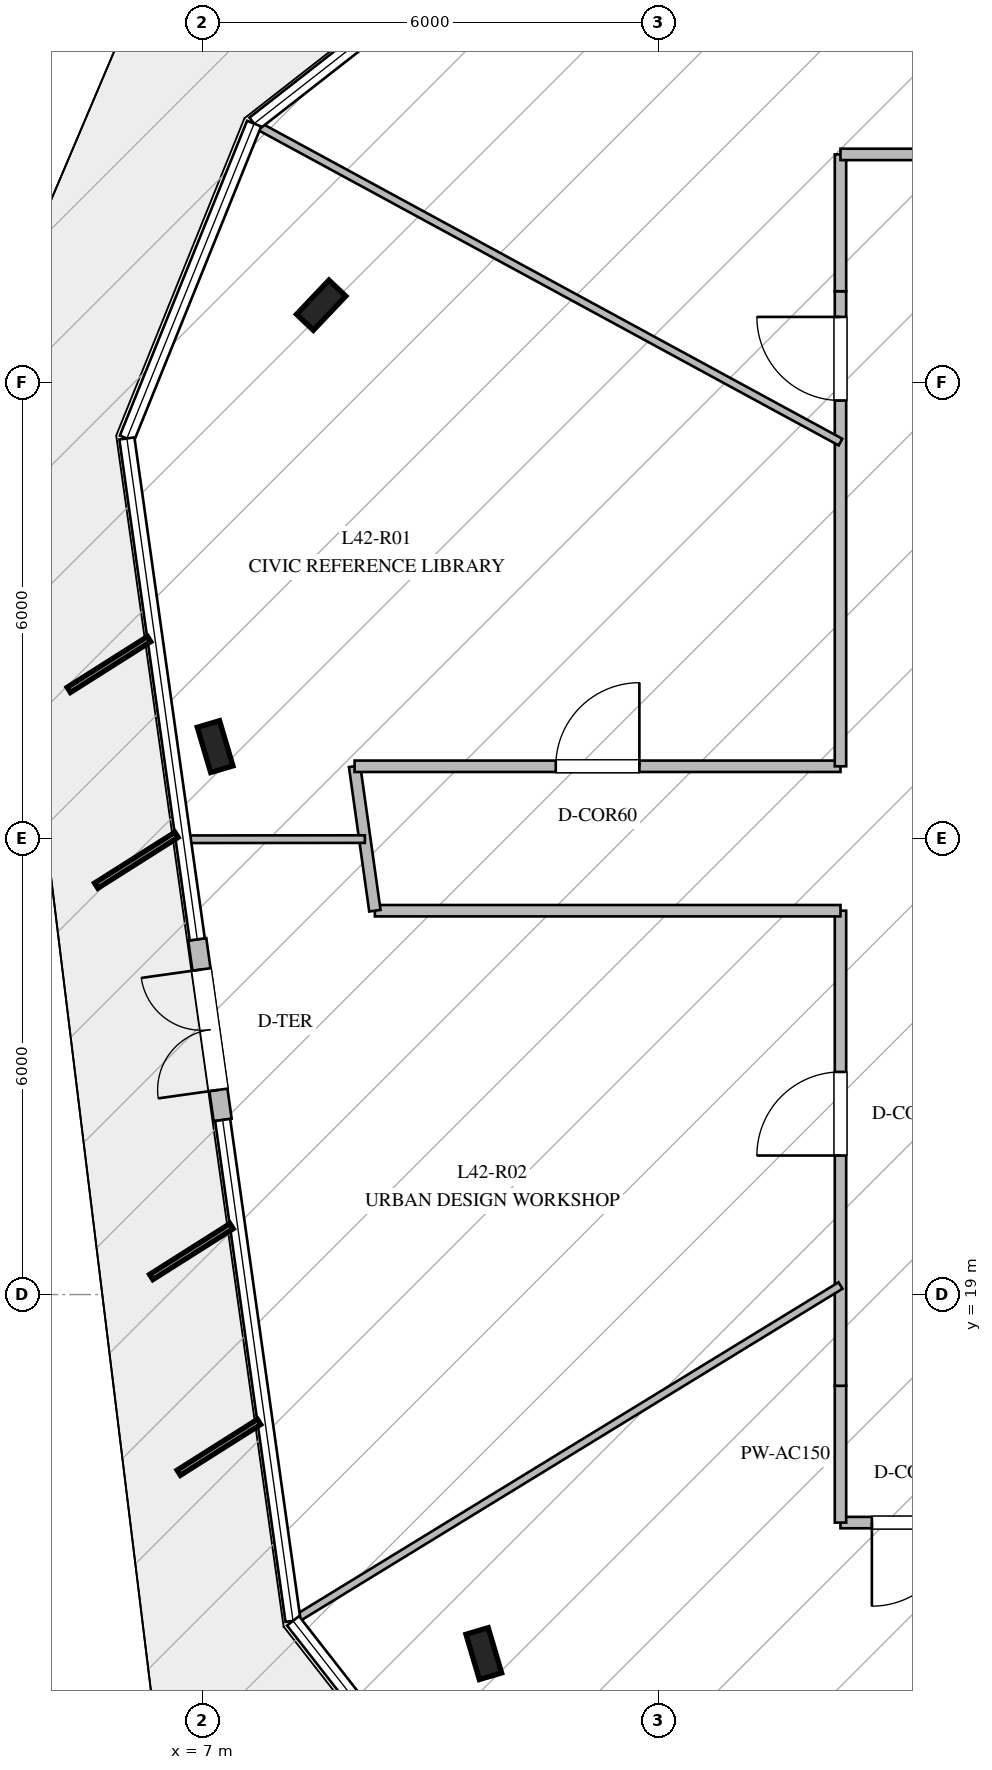
"""IFC4 building model, lengths in metres.
Left out: names, types, materials, properties, quantities, classifications, styles, units other than length and angle.
Written with IfcOpenShell. Run it as: python <this file> out.ifc"""

import sys

from ifc_helpers import new_model, si_unit, direction, frame, frame_2d, origin, origin_2d, place, context, subcontext, project, spatial, rectangle, i_section, extrude, element, fill, save


model = new_model("IFC4")
c1 = context("Model", 3, precision=1e-05, world=origin(), true_north=direction((0.0, 1.0)))
c2 = subcontext(c1, "Body", "Model", "MODEL_VIEW")
j1 = project(units=[si_unit("LENGTHUNIT", "METRE"), si_unit("PLANEANGLEUNIT", "RADIAN")], contexts=[c1])
p1 = place(None, origin())
s1 = spatial("IfcSite", under=j1, at=p1, CompositionType="ELEMENT")
p2 = place(p1, origin())
s2 = spatial("IfcBuilding", under=s1, at=p2, CompositionType="ELEMENT")
p3 = place(p2, frame((0.0, 0.0, 175.8)))
s3 = spatial("IfcBuildingStorey", under=s2, at=p3, CompositionType="ELEMENT", Elevation=175.8)
for number, where, z_axis, x_axis in (
    (1, (8.567, 32.016, -0.27), (0.0, 0.0, 1.0), (0.688, 0.725, 0.0)),
    (2, (7.172, 26.209, -0.27), (0.0, 0.0, 1.0), (-0.284, 0.959, 0.0)),
    (3, (10.707, 14.276, -0.27), (0.0, 0.0, 1.0), (-0.284, 0.959, 0.0)),
):
    element("IfcColumn", number, at=place(p3, frame(where, z_axis=z_axis, x_axis=x_axis)), inside=s3, PredefinedType="COLUMN", context=c2, shape_type="SweptSolid", body=[
        extrude(i_section(OverallWidth=0.305, OverallDepth=0.62, WebThickness=0.021, FlangeThickness=0.04, at=origin_2d()), origin(), (0.0, 0.0, 1.0), 5.27),
    ])
p4 = place(p3, frame((6.937, 23.673, 0.0), z_axis=(0.0, 0.0, 1.0), x_axis=(0.139198704787, -0.990264470021, 0.0)))
e4 = element("IfcWall", 4, at=p4, inside=s3, PredefinedType="STANDARD", context=c2, shape_type="SweptSolid", body=[
    extrude(rectangle(XDim=2.399, YDim=0.24, at=frame_2d((1.2, 0.0))), origin(), (0.0, 0.0, 1.0), 4.78),
])
p5 = place(p4, frame((0.4, 0.0, 0.0)))
e5 = element("IfcOpeningElement", 5, at=p5, cuts=e4, PredefinedType="OPENING", context=c2, shape_type="SweptSolid", body=[
    extrude(rectangle(XDim=1.6, YDim=2.25, at=frame_2d((0.8, 1.125))), frame((0.0, 0.13, 0.0), z_axis=(0.0, -1.0, 0.0), x_axis=(1.0, 0.0, 0.0)), (0.0, 0.0, 1.0), 0.26),
])
p6 = place(p3, frame((17.2, 16.0, 0.0), z_axis=(0.0, 0.0, 1.0), x_axis=(-1.0, 0.0, 0.0)))
e6 = element("IfcWall", 6, at=p6, inside=s3, PredefinedType="PARTITIONING", context=c2, shape_type="SweptSolid", body=[
    extrude(rectangle(XDim=1.8, YDim=0.15, at=frame_2d((0.9, 0.0))), origin(), (0.0, 0.0, 1.0), 4.28),
])
p7 = place(p6, frame((0.287, 0.0, 0.0)))
e7 = element("IfcOpeningElement", 7, at=p7, cuts=e6, PredefinedType="OPENING", context=c2, shape_type="SweptSolid", body=[
    extrude(rectangle(XDim=1.1, YDim=2.2, at=frame_2d((0.55, 1.1))), frame((0.0, 0.085, 0.0), z_axis=(0.0, -1.0, 0.0), x_axis=(1.0, 0.0, 0.0)), (0.0, 0.0, 1.0), 0.17),
])
p8 = place(p3, frame((15.4, 16.0, 0.0), z_axis=(0.0, 0.0, 1.0), x_axis=(0.0, 1.0, 0.0)))
e8 = element("IfcWall", 8, at=p8, inside=s3, PredefinedType="PARTITIONING", context=c2, shape_type="SweptSolid", body=[
    extrude(rectangle(XDim=1.8, YDim=0.15, at=frame_2d((0.9, 0.0))), origin(), (0.0, 0.0, 1.0), 4.28),
])
p9 = place(p3, frame((15.4, 17.8, 0.0), z_axis=(0.0, 0.0, 1.0), x_axis=(0.0, 1.0, 0.0)))
e9 = element("IfcWall", 9, at=p9, inside=s3, PredefinedType="PARTITIONING", context=c2, shape_type="SweptSolid", body=[
    extrude(rectangle(XDim=6.25, YDim=0.15, at=frame_2d((3.125, 0.0))), origin(), (0.0, 0.0, 1.0), 4.78),
])
p10 = place(p9, frame((3.029, 0.0, 0.0)))
e10 = element("IfcOpeningElement", 10, at=p10, cuts=e9, PredefinedType="OPENING", context=c2, shape_type="SweptSolid", body=[
    extrude(rectangle(XDim=1.1, YDim=2.2, at=frame_2d((0.55, 1.1))), frame((0.0, 0.085, 0.0), z_axis=(0.0, -1.0, 0.0), x_axis=(1.0, 0.0, 0.0)), (0.0, 0.0, 1.0), 0.17),
])
p11 = place(p3, frame((15.4, 24.05, 0.0), z_axis=(0.0, 0.0, 1.0), x_axis=(-1.0, 0.0, 0.0)))
e11 = element("IfcWall", 11, at=p11, inside=s3, PredefinedType="PARTITIONING", context=c2, shape_type="SweptSolid", body=[
    extrude(rectangle(XDim=6.126, YDim=0.15, at=frame_2d((3.063, 0.0))), origin(), (0.0, 0.0, 1.0), 4.42),
])
p12 = place(p3, frame((9.274, 24.05, 0.0), z_axis=(0.0, 0.0, 1.0), x_axis=(-0.139087149584, 0.990280144616, 0.0)))
e12 = element("IfcWall", 12, at=p12, inside=s3, PredefinedType="PARTITIONING", context=c2, shape_type="SweptSolid", body=[
    extrude(rectangle(XDim=1.918, YDim=0.15, at=frame_2d((0.959, 0.0))), origin(), (0.0, 0.0, 1.0), 4.78),
])
p13 = place(p3, frame((9.007, 25.95, 0.0), z_axis=(0.0, 0.0, 1.0), x_axis=(1.0, 0.0, 0.0)))
e13 = element("IfcWall", 13, at=p13, inside=s3, PredefinedType="PARTITIONING", context=c2, shape_type="SweptSolid", body=[
    extrude(rectangle(XDim=6.393, YDim=0.15, at=frame_2d((3.196, 0.0))), origin(), (0.0, 0.0, 1.0), 4.42),
])
p14 = place(p13, frame((2.647, 0.0, 0.0)))
e14 = element("IfcOpeningElement", 14, at=p14, cuts=e13, PredefinedType="OPENING", context=c2, shape_type="SweptSolid", body=[
    extrude(rectangle(XDim=1.1, YDim=2.2, at=frame_2d((0.55, 1.1))), frame((0.0, 0.085, 0.0), z_axis=(0.0, -1.0, 0.0), x_axis=(1.0, 0.0, 0.0)), (0.0, 0.0, 1.0), 0.17),
])
p15 = place(p3, frame((15.4, 25.95, 0.0), z_axis=(0.0, 0.0, 1.0), x_axis=(0.0, 1.0, 0.0)))
e15 = element("IfcWall", 15, at=p15, inside=s3, PredefinedType="PARTITIONING", context=c2, shape_type="SweptSolid", body=[
    extrude(rectangle(XDim=6.25, YDim=0.15, at=frame_2d((3.125, 0.0))), origin(), (0.0, 0.0, 1.0), 4.28),
])
p16 = place(p15, frame((4.812, 0.0, 0.0)))
e16 = element("IfcOpeningElement", 16, at=p16, cuts=e15, PredefinedType="OPENING", context=c2, shape_type="SweptSolid", body=[
    extrude(rectangle(XDim=1.1, YDim=2.2, at=frame_2d((0.55, 1.1))), frame((0.0, 0.085, 0.0), z_axis=(0.0, -1.0, 0.0), x_axis=(1.0, 0.0, 0.0)), (0.0, 0.0, 1.0), 0.17),
])
for number, where, z_axis, x_axis in (
    (17, (15.4, 32.2, 0.0), (0.0, 0.0, 1.0), (0.0, 1.0, 0.0)),
    (18, (15.4, 34.0, 0.0), (0.0, 0.0, 1.0), (1.0, 0.0, 0.0)),
):
    element("IfcWall", number, at=place(p3, frame(where, z_axis=z_axis, x_axis=x_axis)), inside=s3, PredefinedType="PARTITIONING", context=c2, shape_type="SweptSolid", body=[
        extrude(rectangle(XDim=1.8, YDim=0.15, at=frame_2d((0.9, 0.0))), origin(), (0.0, 0.0, 1.0), 4.28),
    ])
p17 = place(p3, frame((15.4, 30.215, 0.0), z_axis=(0.0, 0.0, 1.0), x_axis=(-0.878736567254, 0.477307076597, 0.0)))
e19 = element("IfcWall", 19, at=p17, inside=s3, PredefinedType="MOVABLE", context=c2, shape_type="SweptSolid", body=[
    extrude(rectangle(XDim=8.761, YDim=0.1, at=frame_2d((4.381, 0.0))), origin(), (0.0, 0.0, 1.0), 4.18),
])
p18 = place(p3, frame((15.4, 19.119, 0.0), z_axis=(0.0, 0.0, 1.0), x_axis=(-0.852764414146, -0.522295753348, 0.0)))
e20 = element("IfcWall", 20, at=p18, inside=s3, PredefinedType="MOVABLE", context=c2, shape_type="SweptSolid", body=[
    extrude(rectangle(XDim=8.428, YDim=0.1, at=frame_2d((4.214, 0.0))), origin(), (0.0, 0.0, 1.0), 4.18),
])
p19 = place(p3, frame((9.142, 24.992, 0.0), z_axis=(0.0, 0.0, 1.0), x_axis=(-0.999999661298, -0.000823044989, 0.0)))
e21 = element("IfcWall", 21, at=p19, inside=s3, PredefinedType="MOVABLE", context=c2, shape_type="SweptSolid", body=[
    extrude(rectangle(XDim=2.373, YDim=0.1, at=frame_2d((1.187, 0.0))), origin(), (0.0, 0.0, 1.0), 4.18),
])
p20 = place(p5, frame((1.6, 0.0, 0.0), z_axis=(0.0, 0.0, 1.0), x_axis=(-1.0, 0.0, 0.0)))
e22 = element("IfcDoor", 22, at=p20, inside=s3, OperationType="DOUBLE_DOOR_SINGLE_SWING", PredefinedType="DOOR", context=c2, shape_type="SweptSolid", body=[
    extrude(rectangle(XDim=1.6, YDim=2.25, at=frame_2d((0.8, 1.125))), frame((0.0, 0.025, 0.0), z_axis=(0.0, -1.0, 0.0), x_axis=(1.0, 0.0, 0.0)), (0.0, 0.0, 1.0), 0.05),
])
fill(e5, e22)
p21 = place(p14, origin())
e23 = element("IfcDoor", 23, at=p21, inside=s3, OperationType="SINGLE_SWING_RIGHT", PredefinedType="DOOR", context=c2, shape_type="SweptSolid", body=[
    extrude(rectangle(XDim=1.1, YDim=2.2, at=frame_2d((0.55, 1.1))), frame((0.0, 0.025, 0.0), z_axis=(0.0, -1.0, 0.0), x_axis=(1.0, 0.0, 0.0)), (0.0, 0.0, 1.0), 0.05),
])
fill(e14, e23)
p22 = place(p10, origin())
e24 = element("IfcDoor", 24, at=p22, inside=s3, OperationType="SINGLE_SWING_LEFT", PredefinedType="DOOR", context=c2, shape_type="SweptSolid", body=[
    extrude(rectangle(XDim=1.1, YDim=2.2, at=frame_2d((0.55, 1.1))), frame((0.0, 0.025, 0.0), z_axis=(0.0, -1.0, 0.0), x_axis=(1.0, 0.0, 0.0)), (0.0, 0.0, 1.0), 0.05),
])
fill(e10, e24)
p23 = place(p7, origin())
e25 = element("IfcDoor", 25, at=p23, inside=s3, OperationType="SINGLE_SWING_RIGHT", PredefinedType="DOOR", context=c2, shape_type="SweptSolid", body=[
    extrude(rectangle(XDim=1.1, YDim=2.2, at=frame_2d((0.55, 1.1))), frame((0.0, 0.025, 0.0), z_axis=(0.0, -1.0, 0.0), x_axis=(1.0, 0.0, 0.0)), (0.0, 0.0, 1.0), 0.05),
])
fill(e7, e25)
p24 = place(p16, origin())
e26 = element("IfcDoor", 26, at=p24, inside=s3, OperationType="SINGLE_SWING_RIGHT", PredefinedType="DOOR", context=c2, shape_type="SweptSolid", body=[
    extrude(rectangle(XDim=1.1, YDim=2.2, at=frame_2d((0.55, 1.1))), frame((0.0, 0.025, 0.0), z_axis=(0.0, -1.0, 0.0), x_axis=(1.0, 0.0, 0.0)), (0.0, 0.0, 1.0), 0.05),
])
fill(e16, e26)
save(model, sys.argv[1])
